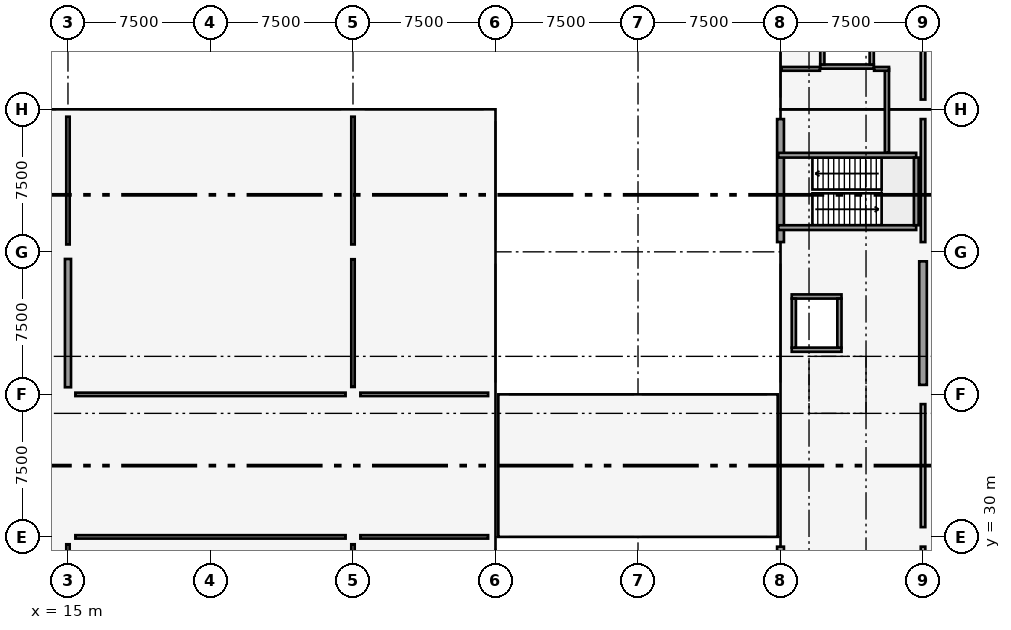
"""IFC4 building model, lengths in metres.
Left out: names, types, materials, properties, quantities, classifications, styles, units other than length and angle.
Written with IfcOpenShell. Run it as: python <this file> out.ifc"""

import sys

from ifc_helpers import new_model, si_unit, direction, frame, frame_2d, origin, origin_2d, place, context, subcontext, project, spatial, rectangle, extrude, element, fill, save


model = new_model("IFC4")
c1 = context("Model", 3, precision=1e-05, world=origin(), true_north=direction((0.0, 1.0)))
c2 = subcontext(c1, "Body", "Model", "MODEL_VIEW")
j1 = project(units=[si_unit("LENGTHUNIT", "METRE"), si_unit("PLANEANGLEUNIT", "RADIAN")], contexts=[c1])
p1 = place(None, origin())
s1 = spatial("IfcSite", under=j1, at=p1, CompositionType="ELEMENT")
p2 = place(p1, origin())
s2 = spatial("IfcBuilding", under=s1, at=p2, CompositionType="ELEMENT")
p3 = place(p2, origin())
s3 = spatial("IfcBuildingStorey", under=s2, at=p3, CompositionType="ELEMENT", Elevation=0.0)
for number, where, z_axis, x_axis in (
    (1, (52.5, 30.0, 0.0), (0.0, 0.0, 1.0), (1.0, 0.0, 0.0)),
    (2, (52.5, 37.5, 0.0), (0.0, 0.0, 1.0), (1.0, 0.0, 0.0)),
    (3, (52.5, 45.0, 0.0), (0.0, 0.0, 1.0), (1.0, 0.0, 0.0)),
    (4, (52.5, 52.5, 0.0), (0.0, 0.0, 1.0), (1.0, 0.0, 0.0)),
    (5, (60.0, 30.0, 0.0), (0.0, 0.0, 1.0), (1.0, 0.0, 0.0)),
    (6, (60.0, 37.5, 0.0), (0.0, 0.0, 1.0), (1.0, 0.0, 0.0)),
    (7, (60.0, 45.0, 0.0), (0.0, 0.0, 1.0), (1.0, 0.0, 0.0)),
    (8, (60.0, 52.5, 0.0), (0.0, 0.0, 1.0), (1.0, 0.0, 0.0)),
):
    element("IfcColumn", number, at=place(p3, frame(where, z_axis=z_axis, x_axis=x_axis)), inside=s3, PredefinedType="COLUMN", context=c2, shape_type="SweptSolid", body=[
        extrude(rectangle(XDim=1.0, YDim=1.0, at=origin_2d()), origin(), (0.0, 0.0, 1.0), 4.8),
    ])
for number, where, z_axis, x_axis in (
    (9, (15.0, 30.0, 0.0), (0.0, 0.0, 1.0), (1.0, 0.0, 0.0)),
    (10, (15.0, 37.5, 0.0), (0.0, 0.0, 1.0), (1.0, 0.0, 0.0)),
    (11, (15.0, 45.0, 0.0), (0.0, 0.0, 1.0), (1.0, 0.0, 0.0)),
    (12, (15.0, 52.5, 0.0), (0.0, 0.0, 1.0), (1.0, 0.0, 0.0)),
    (13, (30.0, 30.0, 0.0), (0.0, 0.0, 1.0), (1.0, 0.0, 0.0)),
    (14, (30.0, 37.5, 0.0), (0.0, 0.0, 1.0), (1.0, 0.0, 0.0)),
    (15, (30.0, 45.0, 0.0), (0.0, 0.0, 1.0), (1.0, 0.0, 0.0)),
    (16, (30.0, 52.5, 0.0), (0.0, 0.0, 1.0), (1.0, 0.0, 0.0)),
    (17, (37.5, 30.0, 0.0), (0.0, 0.0, 1.0), (1.0, 0.0, 0.0)),
    (18, (37.5, 37.5, 0.0), (0.0, 0.0, 1.0), (1.0, 0.0, 0.0)),
    (19, (37.5, 45.0, 0.0), (0.0, 0.0, 1.0), (1.0, 0.0, 0.0)),
    (20, (37.5, 52.5, 0.0), (0.0, 0.0, 1.0), (1.0, 0.0, 0.0)),
):
    element("IfcColumn", number, at=place(p3, frame(where, z_axis=z_axis, x_axis=x_axis)), inside=s3, PredefinedType="COLUMN", context=c2, shape_type="SweptSolid", body=[
        extrude(rectangle(XDim=0.75, YDim=0.75, at=origin_2d()), origin(), (0.0, 0.0, 1.0), 4.8),
    ])
p4 = place(p3, frame((60.0, 38.0, 0.0), z_axis=(0.0, 0.0, 1.0), x_axis=(0.0, 1.0, 0.0)))
e21 = element("IfcWall", 21, at=p4, inside=s3, PredefinedType="SHEAR", context=c2, shape_type="SweptSolid", body=[
    extrude(rectangle(XDim=6.5, YDim=0.4, at=frame_2d((3.25, 0.0))), origin(), (0.0, 0.0, 1.0), 3.0),
])
p5 = place(p3, frame((15.0, 37.875, 0.0), z_axis=(0.0, 0.0, 1.0), x_axis=(0.0, 1.0, 0.0)))
e22 = element("IfcWall", 22, at=p5, inside=s3, PredefinedType="SHEAR", context=c2, shape_type="SweptSolid", body=[
    extrude(rectangle(XDim=6.75, YDim=0.32, at=frame_2d((3.375, 0.0))), origin(), (0.0, 0.0, 1.0), 4.5),
])
p6 = place(p3, frame((52.5, 23.015, 0.0), z_axis=(0.0, 0.0, 1.0), x_axis=(0.0, 1.0, 0.0)))
e23 = element("IfcWall", 23, at=p6, inside=s3, PredefinedType="SOLIDWALL", context=c2, shape_type="SweptSolid", body=[
    extrude(rectangle(XDim=6.47, YDim=0.36, at=frame_2d((3.235, 0.0))), origin(), (0.0, 0.0, 1.0), 3.42),
])
p7 = place(p6, frame((1.12, 0.0, 0.6)))
e24 = element("IfcOpeningElement", 24, at=p7, cuts=e23, PredefinedType="OPENING", context=c2, shape_type="SweptSolid", body=[
    extrude(rectangle(XDim=1.1, YDim=1.8, at=frame_2d((0.55, 0.9))), frame((0.0, 0.19, 0.0), z_axis=(0.0, -1.0, 0.0), x_axis=(1.0, 0.0, 0.0)), (0.0, 0.0, 1.0), 0.38),
])
p8 = place(p6, frame((4.15, 0.0, 0.6)))
e25 = element("IfcOpeningElement", 25, at=p8, cuts=e23, PredefinedType="OPENING", context=c2, shape_type="SweptSolid", body=[
    extrude(rectangle(XDim=1.3, YDim=1.3, at=frame_2d((0.65, 0.65))), frame((0.0, 0.19, 0.0), z_axis=(0.0, -1.0, 0.0), x_axis=(1.0, 0.0, 0.0)), (0.0, 0.0, 1.0), 0.38),
])
p9 = place(p3, frame((52.5, 45.515, 0.0), z_axis=(0.0, 0.0, 1.0), x_axis=(0.0, 1.0, 0.0)))
e26 = element("IfcWall", 26, at=p9, inside=s3, PredefinedType="SOLIDWALL", context=c2, shape_type="SweptSolid", body=[
    extrude(rectangle(XDim=6.47, YDim=0.36, at=frame_2d((3.235, 0.0))), origin(), (0.0, 0.0, 1.0), 3.67),
])
p10 = place(p9, frame((2.022, 0.0, 0.0)))
e27 = element("IfcOpeningElement", 27, at=p10, cuts=e26, PredefinedType="OPENING", context=c2, shape_type="SweptSolid", body=[
    extrude(rectangle(XDim=1.8, YDim=2.2, at=frame_2d((0.9, 1.1))), frame((0.0, 0.19, 0.0), z_axis=(0.0, -1.0, 0.0), x_axis=(1.0, 0.0, 0.0)), (0.0, 0.0, 1.0), 0.38),
])
p11 = place(p3, frame((52.38, 46.275, 0.0), z_axis=(0.0, 0.0, 1.0), x_axis=(1.0, 0.0, 0.0)))
e28 = element("IfcWall", 28, at=p11, inside=s3, PredefinedType="SOLIDWALL", context=c2, shape_type="SweptSolid", body=[
    extrude(rectangle(XDim=7.26, YDim=0.25, at=frame_2d((3.63, 0.0))), origin(), (0.0, 0.0, 1.0), 4.5),
])
p12 = place(p11, frame((0.62, 0.0, 0.0)))
e29 = element("IfcOpeningElement", 29, at=p12, cuts=e28, PredefinedType="OPENING", context=c2, shape_type="SweptSolid", body=[
    extrude(rectangle(XDim=1.1, YDim=2.15, at=frame_2d((0.55, 1.075))), frame((0.0, 0.135, 0.0), z_axis=(0.0, -1.0, 0.0), x_axis=(1.0, 0.0, 0.0)), (0.0, 0.0, 1.0), 0.27),
])
p13 = place(p3, frame((52.38, 50.085, 0.0), z_axis=(0.0, 0.0, 1.0), x_axis=(1.0, 0.0, 0.0)))
e30 = element("IfcWall", 30, at=p13, inside=s3, PredefinedType="SOLIDWALL", context=c2, shape_type="SweptSolid", body=[
    extrude(rectangle(XDim=7.26, YDim=0.25, at=frame_2d((3.63, 0.0))), origin(), (0.0, 0.0, 1.0), 4.5),
])
p14 = place(p13, frame((0.62, 0.0, 0.0)))
e31 = element("IfcOpeningElement", 31, at=p14, cuts=e30, PredefinedType="OPENING", context=c2, shape_type="SweptSolid", body=[
    extrude(rectangle(XDim=1.1, YDim=2.15, at=frame_2d((0.55, 1.075))), frame((0.0, 0.135, 0.0), z_axis=(0.0, -1.0, 0.0), x_axis=(1.0, 0.0, 0.0)), (0.0, 0.0, 1.0), 0.27),
])
p15 = place(p3, frame((59.645, 46.4, 0.0), z_axis=(0.0, 0.0, 1.0), x_axis=(0.0, 1.0, 0.0)))
e32 = element("IfcWall", 32, at=p15, inside=s3, PredefinedType="SOLIDWALL", context=c2, shape_type="SweptSolid", body=[
    extrude(rectangle(XDim=3.56, YDim=0.25, at=frame_2d((1.78, 0.0))), origin(), (0.0, 0.0, 1.0), 4.5),
])
for number, where, z_axis, x_axis in (
    (33, (53.09, 39.85, 0.0), (0.0, 0.0, 1.0), (1.0, 0.0, 0.0)),
    (34, (53.09, 42.65, 0.0), (0.0, 0.0, 1.0), (1.0, 0.0, 0.0)),
):
    element("IfcWall", number, at=place(p3, frame(where, z_axis=z_axis, x_axis=x_axis)), inside=s3, PredefinedType="SOLIDWALL", context=c2, shape_type="SweptSolid", body=[
        extrude(rectangle(XDim=2.62, YDim=0.22, at=frame_2d((1.31, 0.0))), origin(), (0.0, 0.0, 1.0), 4.5),
    ])
p16 = place(p3, frame((53.2, 39.96, 0.0), z_axis=(0.0, 0.0, 1.0), x_axis=(0.0, 1.0, 0.0)))
e35 = element("IfcWall", 35, at=p16, inside=s3, PredefinedType="SOLIDWALL", context=c2, shape_type="SweptSolid", body=[
    extrude(rectangle(XDim=2.58, YDim=0.22, at=frame_2d((1.29, 0.0))), origin(), (0.0, 0.0, 1.0), 4.5),
])
p17 = place(p3, frame((55.6, 39.96, 0.0), z_axis=(0.0, 0.0, 1.0), x_axis=(0.0, 1.0, 0.0)))
e36 = element("IfcWall", 36, at=p17, inside=s3, PredefinedType="SOLIDWALL", context=c2, shape_type="SweptSolid", body=[
    extrude(rectangle(XDim=2.58, YDim=0.22, at=frame_2d((1.29, 0.0))), origin(), (0.0, 0.0, 1.0), 4.5),
])
p18 = place(p17, frame((0.79, 0.0, 0.0)))
e37 = element("IfcOpeningElement", 37, at=p18, cuts=e36, PredefinedType="OPENING", context=c2, shape_type="SweptSolid", body=[
    extrude(rectangle(XDim=1.0, YDim=2.15, at=frame_2d((0.5, 1.075))), frame((0.0, 0.12, 0.0), z_axis=(0.0, -1.0, 0.0), x_axis=(1.0, 0.0, 0.0)), (0.0, 0.0, 1.0), 0.24),
])
p19 = place(p3, frame((54.59, 54.75, 0.0), z_axis=(0.0, 0.0, 1.0), x_axis=(1.0, 0.0, 0.0)))
e38 = element("IfcWall", 38, at=p19, inside=s3, PredefinedType="SOLIDWALL", context=c2, shape_type="SweptSolid", body=[
    extrude(rectangle(XDim=2.82, YDim=0.22, at=frame_2d((1.41, 0.0))), origin(), (0.0, 0.0, 1.0), 4.5),
])
p20 = place(p19, frame((0.86, 0.0, 0.0)))
e39 = element("IfcOpeningElement", 39, at=p20, cuts=e38, PredefinedType="OPENING", context=c2, shape_type="SweptSolid", body=[
    extrude(rectangle(XDim=1.1, YDim=2.15, at=frame_2d((0.55, 1.075))), frame((0.0, 0.12, 0.0), z_axis=(0.0, -1.0, 0.0), x_axis=(1.0, 0.0, 0.0)), (0.0, 0.0, 1.0), 0.24),
])
for number, where, z_axis, x_axis in (
    (40, (54.7, 54.86, 0.0), (0.0, 0.0, 1.0), (0.0, 1.0, 0.0)),
    (41, (57.3, 54.86, 0.0), (0.0, 0.0, 1.0), (0.0, 1.0, 0.0)),
):
    element("IfcWall", number, at=place(p3, frame(where, z_axis=z_axis, x_axis=x_axis)), inside=s3, PredefinedType="SOLIDWALL", context=c2, shape_type="SweptSolid", body=[
        extrude(rectangle(XDim=2.78, YDim=0.22, at=frame_2d((1.39, 0.0))), origin(), (0.0, 0.0, 1.0), 4.5),
    ])
p21 = place(p3, frame((58.1, 50.22, 0.0), z_axis=(0.0, 0.0, 1.0), x_axis=(0.0, 1.0, 0.0)))
e42 = element("IfcWall", 42, at=p21, inside=s3, PredefinedType="SOLIDWALL", context=c2, shape_type="SweptSolid", body=[
    extrude(rectangle(XDim=4.41, YDim=0.22, at=frame_2d((2.205, 0.0))), origin(), (0.0, 0.0, 1.0), 4.5),
])
p22 = place(p21, frame((0.45, 0.0, 0.0)))
e43 = element("IfcOpeningElement", 43, at=p22, cuts=e42, PredefinedType="OPENING", context=c2, shape_type="SweptSolid", body=[
    extrude(rectangle(XDim=1.1, YDim=2.15, at=frame_2d((0.55, 1.075))), frame((0.0, 0.12, 0.0), z_axis=(0.0, -1.0, 0.0), x_axis=(1.0, 0.0, 0.0)), (0.0, 0.0, 1.0), 0.24),
])
p23 = place(p3, frame((52.56, 54.63, 0.0), z_axis=(0.0, 0.0, 1.0), x_axis=(1.0, 0.0, 0.0)))
e44 = element("IfcWall", 44, at=p23, inside=s3, PredefinedType="PARTITIONING", context=c2, shape_type="SweptSolid", body=[
    extrude(rectangle(XDim=2.015, YDim=0.2, at=frame_2d((1.007, 0.0))), origin(), (0.0, 0.0, 1.0), 3.88),
])
p24 = place(p3, frame((57.425, 54.63, 0.0), z_axis=(0.0, 0.0, 1.0), x_axis=(1.0, 0.0, 0.0)))
e45 = element("IfcWall", 45, at=p24, inside=s3, PredefinedType="PARTITIONING", context=c2, shape_type="SweptSolid", body=[
    extrude(rectangle(XDim=0.785, YDim=0.2, at=frame_2d((0.393, 0.0))), origin(), (0.0, 0.0, 1.0), 4.48),
])
p25 = place(p3, frame((15.389, 30.0, 0.0), z_axis=(0.0, 0.0, 1.0), x_axis=(1.0, 0.0, 0.0)))
e46 = element("IfcWall", 46, at=p25, inside=s3, PredefinedType="PARTITIONING", context=c2, shape_type="SweptSolid", body=[
    extrude(rectangle(XDim=14.222, YDim=0.18, at=frame_2d((7.111, 0.0))), origin(), (0.0, 0.0, 1.0), 2.97),
])
p26 = place(p25, frame((6.161, 0.0, 0.0)))
e47 = element("IfcOpeningElement", 47, at=p26, cuts=e46, PredefinedType="OPENING", context=c2, shape_type="SweptSolid", body=[
    extrude(rectangle(XDim=1.9, YDim=2.18, at=frame_2d((0.95, 1.09))), frame((0.0, 0.1, 0.0), z_axis=(0.0, -1.0, 0.0), x_axis=(1.0, 0.0, 0.0)), (0.0, 0.0, 1.0), 0.2),
])
p27 = place(p3, frame((30.389, 30.0, 0.0), z_axis=(0.0, 0.0, 1.0), x_axis=(1.0, 0.0, 0.0)))
e48 = element("IfcWall", 48, at=p27, inside=s3, PredefinedType="PARTITIONING", context=c2, shape_type="SweptSolid", body=[
    extrude(rectangle(XDim=6.722, YDim=0.18, at=frame_2d((3.361, 0.0))), origin(), (0.0, 0.0, 1.0), 2.97),
])
p28 = place(p27, frame((2.611, 0.0, 0.0)))
e49 = element("IfcOpeningElement", 49, at=p28, cuts=e48, PredefinedType="OPENING", context=c2, shape_type="SweptSolid", body=[
    extrude(rectangle(XDim=1.5, YDim=2.16, at=frame_2d((0.75, 1.08))), frame((0.0, 0.1, 0.0), z_axis=(0.0, -1.0, 0.0), x_axis=(1.0, 0.0, 0.0)), (0.0, 0.0, 1.0), 0.2),
])
p29 = place(p3, frame((15.389, 37.5, 0.0), z_axis=(0.0, 0.0, 1.0), x_axis=(1.0, 0.0, 0.0)))
e50 = element("IfcWall", 50, at=p29, inside=s3, PredefinedType="PARTITIONING", context=c2, shape_type="SweptSolid", body=[
    extrude(rectangle(XDim=14.222, YDim=0.18, at=frame_2d((7.111, 0.0))), origin(), (0.0, 0.0, 1.0), 2.97),
])
p30 = place(p29, frame((6.261, 0.0, 0.0)))
e51 = element("IfcOpeningElement", 51, at=p30, cuts=e50, PredefinedType="OPENING", context=c2, shape_type="SweptSolid", body=[
    extrude(rectangle(XDim=1.7, YDim=2.16, at=frame_2d((0.85, 1.08))), frame((0.0, 0.1, 0.0), z_axis=(0.0, -1.0, 0.0), x_axis=(1.0, 0.0, 0.0)), (0.0, 0.0, 1.0), 0.2),
])
p31 = place(p3, frame((30.389, 37.5, 0.0), z_axis=(0.0, 0.0, 1.0), x_axis=(1.0, 0.0, 0.0)))
e52 = element("IfcWall", 52, at=p31, inside=s3, PredefinedType="PARTITIONING", context=c2, shape_type="SweptSolid", body=[
    extrude(rectangle(XDim=6.722, YDim=0.18, at=frame_2d((3.361, 0.0))), origin(), (0.0, 0.0, 1.0), 2.97),
])
p32 = place(p31, frame((2.511, 0.0, 0.0)))
e53 = element("IfcOpeningElement", 53, at=p32, cuts=e52, PredefinedType="OPENING", context=c2, shape_type="SweptSolid", body=[
    extrude(rectangle(XDim=1.7, YDim=2.16, at=frame_2d((0.85, 1.08))), frame((0.0, 0.1, 0.0), z_axis=(0.0, -1.0, 0.0), x_axis=(1.0, 0.0, 0.0)), (0.0, 0.0, 1.0), 0.2),
])
for number, where, z_axis, x_axis in (
    (54, (30.0, 22.889, 0.0), (0.0, 0.0, 1.0), (0.0, 1.0, 0.0)),
    (55, (30.0, 37.889, 0.0), (0.0, 0.0, 1.0), (0.0, 1.0, 0.0)),
    (56, (30.0, 45.389, 0.0), (0.0, 0.0, 1.0), (0.0, 1.0, 0.0)),
):
    element("IfcWall", number, at=place(p3, frame(where, z_axis=z_axis, x_axis=x_axis)), inside=s3, PredefinedType="PARTITIONING", context=c2, shape_type="SweptSolid", body=[
        extrude(rectangle(XDim=6.722, YDim=0.18, at=frame_2d((3.361, 0.0))), origin(), (0.0, 0.0, 1.0), 2.97),
    ])
p33 = place(p3, frame((15.0, 22.889, 0.0), z_axis=(0.0, 0.0, 1.0), x_axis=(0.0, 1.0, 0.0)))
e57 = element("IfcWall", 57, at=p33, inside=s3, PredefinedType="PARTITIONING", context=c2, shape_type="SweptSolid", body=[
    extrude(rectangle(XDim=6.722, YDim=0.18, at=frame_2d((3.361, 0.0))), origin(), (0.0, 0.0, 1.0), 2.97),
])
p34 = place(p33, frame((2.411, 0.0, 0.0)))
e58 = element("IfcOpeningElement", 58, at=p34, cuts=e57, PredefinedType="OPENING", context=c2, shape_type="SweptSolid", body=[
    extrude(rectangle(XDim=1.9, YDim=2.18, at=frame_2d((0.95, 1.09))), frame((0.0, 0.1, 0.0), z_axis=(0.0, -1.0, 0.0), x_axis=(1.0, 0.0, 0.0)), (0.0, 0.0, 1.0), 0.2),
])
p35 = place(p3, frame((15.0, 45.389, 0.0), z_axis=(0.0, 0.0, 1.0), x_axis=(0.0, 1.0, 0.0)))
e59 = element("IfcWall", 59, at=p35, inside=s3, PredefinedType="PARTITIONING", context=c2, shape_type="SweptSolid", body=[
    extrude(rectangle(XDim=6.722, YDim=0.18, at=frame_2d((3.361, 0.0))), origin(), (0.0, 0.0, 1.0), 2.97),
])
p36 = place(p35, frame((2.511, 0.0, 0.0)))
e60 = element("IfcOpeningElement", 60, at=p36, cuts=e59, PredefinedType="OPENING", context=c2, shape_type="SweptSolid", body=[
    extrude(rectangle(XDim=1.7, YDim=2.16, at=frame_2d((0.85, 1.08))), frame((0.0, 0.1, 0.0), z_axis=(0.0, -1.0, 0.0), x_axis=(1.0, 0.0, 0.0)), (0.0, 0.0, 1.0), 0.2),
])
p37 = place(p3, frame((60.0, 23.014, 0.0), z_axis=(0.0, 0.0, 1.0), x_axis=(0.0, 1.0, 0.0)))
e61 = element("IfcWall", 61, at=p37, inside=s3, PredefinedType="PARTITIONING", context=c2, shape_type="SweptSolid", body=[
    extrude(rectangle(XDim=6.472, YDim=0.24, at=frame_2d((3.236, 0.0))), origin(), (0.0, 0.0, 1.0), 3.42),
])
p38 = place(p37, frame((2.486, 0.0, 0.0)))
e62 = element("IfcOpeningElement", 62, at=p38, cuts=e61, PredefinedType="OPENING", context=c2, shape_type="SweptSolid", body=[
    extrude(rectangle(XDim=1.5, YDim=2.16, at=frame_2d((0.75, 1.08))), frame((0.0, 0.13, 0.0), z_axis=(0.0, -1.0, 0.0), x_axis=(1.0, 0.0, 0.0)), (0.0, 0.0, 1.0), 0.26),
])
p39 = place(p3, frame((60.0, 30.514, 0.0), z_axis=(0.0, 0.0, 1.0), x_axis=(0.0, 1.0, 0.0)))
e63 = element("IfcWall", 63, at=p39, inside=s3, PredefinedType="PARTITIONING", context=c2, shape_type="SweptSolid", body=[
    extrude(rectangle(XDim=6.472, YDim=0.24, at=frame_2d((3.236, 0.0))), origin(), (0.0, 0.0, 1.0), 2.97),
])
p40 = place(p39, frame((2.336, 0.0, 0.0)))
e64 = element("IfcOpeningElement", 64, at=p40, cuts=e63, PredefinedType="OPENING", context=c2, shape_type="SweptSolid", body=[
    extrude(rectangle(XDim=1.8, YDim=2.16, at=frame_2d((0.9, 1.08))), frame((0.0, 0.13, 0.0), z_axis=(0.0, -1.0, 0.0), x_axis=(1.0, 0.0, 0.0)), (0.0, 0.0, 1.0), 0.26),
])
p41 = place(p3, frame((60.0, 45.514, 0.0), z_axis=(0.0, 0.0, 1.0), x_axis=(0.0, 1.0, 0.0)))
e65 = element("IfcWall", 65, at=p41, inside=s3, PredefinedType="PARTITIONING", context=c2, shape_type="SweptSolid", body=[
    extrude(rectangle(XDim=6.472, YDim=0.24, at=frame_2d((3.236, 0.0))), origin(), (0.0, 0.0, 1.0), 2.97),
])
p42 = place(p3, frame((60.0, 53.014, 0.0), z_axis=(0.0, 0.0, 1.0), x_axis=(0.0, 1.0, 0.0)))
e66 = element("IfcWall", 66, at=p42, inside=s3, PredefinedType="PARTITIONING", context=c2, shape_type="SweptSolid", body=[
    extrude(rectangle(XDim=6.472, YDim=0.24, at=frame_2d((3.236, 0.0))), origin(), (0.0, 0.0, 1.0), 2.97),
])
p43 = place(p42, frame((2.436, 0.0, 0.0)))
e67 = element("IfcOpeningElement", 67, at=p43, cuts=e66, PredefinedType="OPENING", context=c2, shape_type="SweptSolid", body=[
    extrude(rectangle(XDim=1.6, YDim=2.15, at=frame_2d((0.8, 1.075))), frame((0.0, 0.13, 0.0), z_axis=(0.0, -1.0, 0.0), x_axis=(1.0, 0.0, 0.0)), (0.0, 0.0, 1.0), 0.26),
])
p44 = place(p10, origin())
e68 = element("IfcDoor", 68, at=p44, inside=s3, OperationType="SINGLE_SWING_RIGHT", PredefinedType="DOOR", context=c2, shape_type="SweptSolid", body=[
    extrude(rectangle(XDim=1.8, YDim=2.2, at=frame_2d((0.9, 1.1))), frame((0.0, 0.025, 0.0), z_axis=(0.0, -1.0, 0.0), x_axis=(1.0, 0.0, 0.0)), (0.0, 0.0, 1.0), 0.05),
])
fill(e27, e68)
p45 = place(p12, origin())
e69 = element("IfcDoor", 69, at=p45, inside=s3, OperationType="SINGLE_SWING_LEFT", PredefinedType="DOOR", context=c2, shape_type="SweptSolid", body=[
    extrude(rectangle(XDim=1.1, YDim=2.15, at=frame_2d((0.55, 1.075))), frame((0.0, 0.025, 0.0), z_axis=(0.0, -1.0, 0.0), x_axis=(1.0, 0.0, 0.0)), (0.0, 0.0, 1.0), 0.05),
])
fill(e29, e69)
p46 = place(p14, frame((1.1, 0.0, 0.0), z_axis=(0.0, 0.0, 1.0), x_axis=(-1.0, 0.0, 0.0)))
e70 = element("IfcDoor", 70, at=p46, inside=s3, OperationType="SINGLE_SWING_RIGHT", PredefinedType="DOOR", context=c2, shape_type="SweptSolid", body=[
    extrude(rectangle(XDim=1.1, YDim=2.15, at=frame_2d((0.55, 1.075))), frame((0.0, 0.025, 0.0), z_axis=(0.0, -1.0, 0.0), x_axis=(1.0, 0.0, 0.0)), (0.0, 0.0, 1.0), 0.05),
])
fill(e31, e70)
p47 = place(p18, origin())
e71 = element("IfcDoor", 71, at=p47, inside=s3, OperationType="SLIDING_TO_LEFT", PredefinedType="DOOR", context=c2, shape_type="SweptSolid", body=[
    extrude(rectangle(XDim=1.0, YDim=2.15, at=frame_2d((0.5, 1.075))), frame((0.0, 0.025, 0.0), z_axis=(0.0, -1.0, 0.0), x_axis=(1.0, 0.0, 0.0)), (0.0, 0.0, 1.0), 0.05),
])
fill(e37, e71)
p48 = place(p20, origin())
e72 = element("IfcDoor", 72, at=p48, inside=s3, OperationType="SLIDING_TO_LEFT", PredefinedType="DOOR", context=c2, shape_type="SweptSolid", body=[
    extrude(rectangle(XDim=1.1, YDim=2.15, at=frame_2d((0.55, 1.075))), frame((0.0, 0.025, 0.0), z_axis=(0.0, -1.0, 0.0), x_axis=(1.0, 0.0, 0.0)), (0.0, 0.0, 1.0), 0.05),
])
fill(e39, e72)
p49 = place(p22, origin())
e73 = element("IfcDoor", 73, at=p49, inside=s3, OperationType="SINGLE_SWING_RIGHT", PredefinedType="DOOR", context=c2, shape_type="SweptSolid", body=[
    extrude(rectangle(XDim=1.1, YDim=2.15, at=frame_2d((0.55, 1.075))), frame((0.0, 0.025, 0.0), z_axis=(0.0, -1.0, 0.0), x_axis=(1.0, 0.0, 0.0)), (0.0, 0.0, 1.0), 0.05),
])
fill(e43, e73)
p50 = place(p26, origin())
e74 = element("IfcDoor", 74, at=p50, inside=s3, OperationType="SINGLE_SWING_RIGHT", PredefinedType="DOOR", context=c2, shape_type="SweptSolid", body=[
    extrude(rectangle(XDim=1.9, YDim=2.18, at=frame_2d((0.95, 1.09))), frame((0.0, 0.025, 0.0), z_axis=(0.0, -1.0, 0.0), x_axis=(1.0, 0.0, 0.0)), (0.0, 0.0, 1.0), 0.05),
])
fill(e47, e74)
p51 = place(p28, origin())
e75 = element("IfcDoor", 75, at=p51, inside=s3, OperationType="SINGLE_SWING_LEFT", PredefinedType="DOOR", context=c2, shape_type="SweptSolid", body=[
    extrude(rectangle(XDim=1.5, YDim=2.16, at=frame_2d((0.75, 1.08))), frame((0.0, 0.025, 0.0), z_axis=(0.0, -1.0, 0.0), x_axis=(1.0, 0.0, 0.0)), (0.0, 0.0, 1.0), 0.05),
])
fill(e49, e75)
p52 = place(p30, origin())
e76 = element("IfcDoor", 76, at=p52, inside=s3, OperationType="SINGLE_SWING_RIGHT", PredefinedType="DOOR", context=c2, shape_type="SweptSolid", body=[
    extrude(rectangle(XDim=1.7, YDim=2.16, at=frame_2d((0.85, 1.08))), frame((0.0, 0.025, 0.0), z_axis=(0.0, -1.0, 0.0), x_axis=(1.0, 0.0, 0.0)), (0.0, 0.0, 1.0), 0.05),
])
fill(e51, e76)
p53 = place(p32, origin())
e77 = element("IfcDoor", 77, at=p53, inside=s3, OperationType="SINGLE_SWING_LEFT", PredefinedType="DOOR", context=c2, shape_type="SweptSolid", body=[
    extrude(rectangle(XDim=1.7, YDim=2.16, at=frame_2d((0.85, 1.08))), frame((0.0, 0.025, 0.0), z_axis=(0.0, -1.0, 0.0), x_axis=(1.0, 0.0, 0.0)), (0.0, 0.0, 1.0), 0.05),
])
fill(e53, e77)
p54 = place(p36, origin())
e78 = element("IfcDoor", 78, at=p54, inside=s3, OperationType="SINGLE_SWING_LEFT", PredefinedType="DOOR", context=c2, shape_type="SweptSolid", body=[
    extrude(rectangle(XDim=1.7, YDim=2.16, at=frame_2d((0.85, 1.08))), frame((0.0, 0.025, 0.0), z_axis=(0.0, -1.0, 0.0), x_axis=(1.0, 0.0, 0.0)), (0.0, 0.0, 1.0), 0.05),
])
fill(e60, e78)
p55 = place(p40, origin())
e79 = element("IfcDoor", 79, at=p55, inside=s3, OperationType="SINGLE_SWING_LEFT", PredefinedType="DOOR", context=c2, shape_type="SweptSolid", body=[
    extrude(rectangle(XDim=1.8, YDim=2.16, at=frame_2d((0.9, 1.08))), frame((0.0, 0.025, 0.0), z_axis=(0.0, -1.0, 0.0), x_axis=(1.0, 0.0, 0.0)), (0.0, 0.0, 1.0), 0.05),
])
fill(e64, e79)
p56 = place(p43, origin())
e80 = element("IfcDoor", 80, at=p56, inside=s3, OperationType="SINGLE_SWING_RIGHT", PredefinedType="DOOR", context=c2, shape_type="SweptSolid", body=[
    extrude(rectangle(XDim=1.6, YDim=2.15, at=frame_2d((0.8, 1.075))), frame((0.0, 0.025, 0.0), z_axis=(0.0, -1.0, 0.0), x_axis=(1.0, 0.0, 0.0)), (0.0, 0.0, 1.0), 0.05),
])
fill(e67, e80)
save(model, sys.argv[1])
